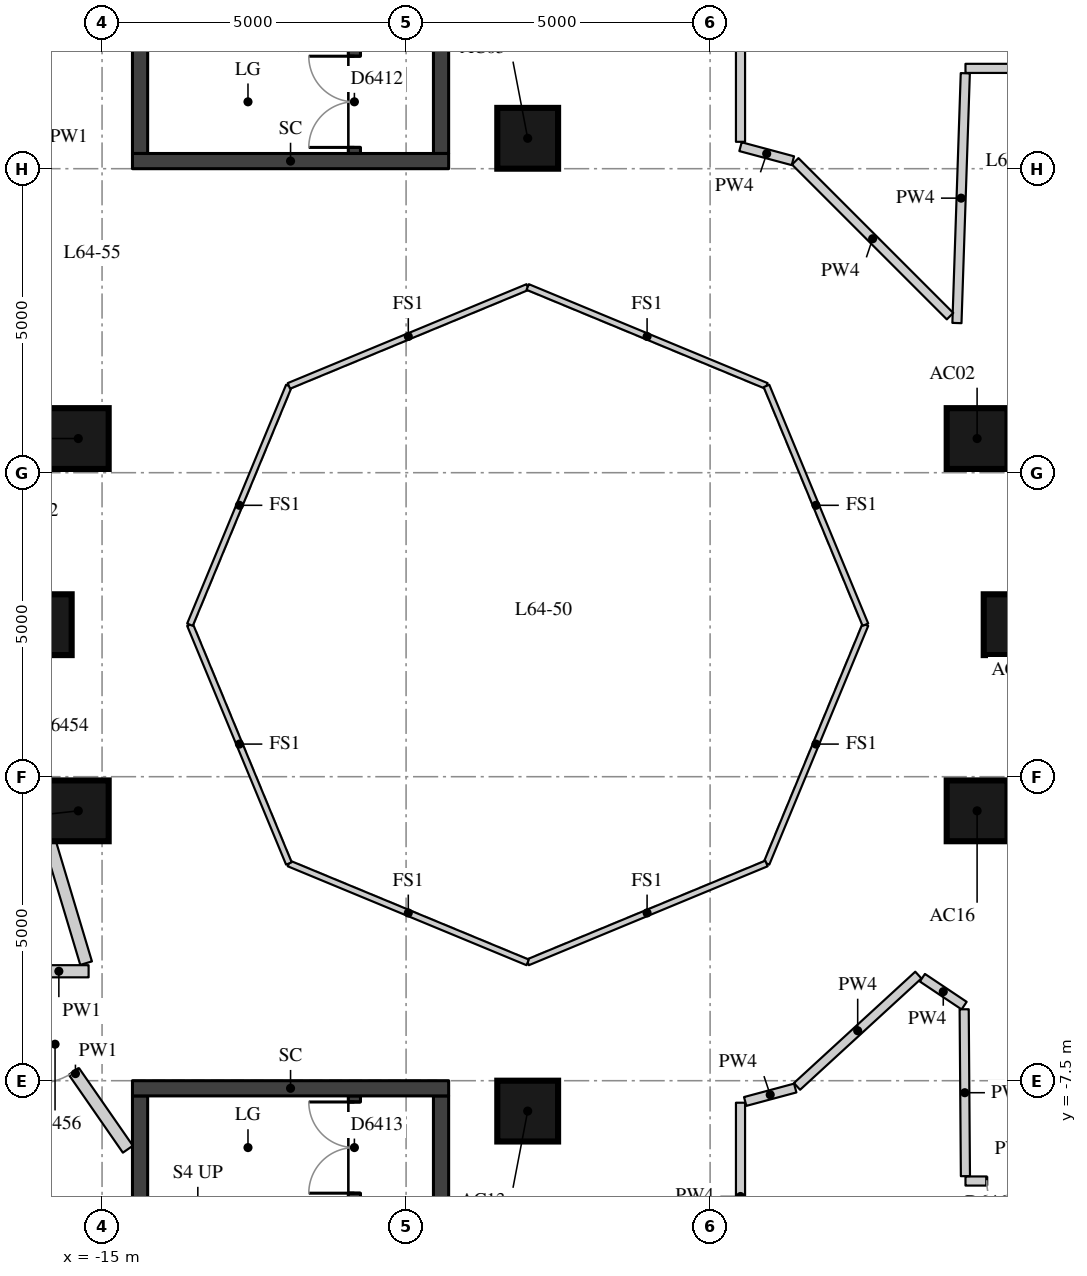
"""IFC4 building model, lengths in metres.
Left out: names, types, materials, properties, quantities, classifications, styles, units other than length and angle.
Written with IfcOpenShell. Run it as: python <this file> out.ifc"""

import sys

from ifc_helpers import new_model, si_unit, direction, frame, frame_2d, origin, origin_2d, place, context, subcontext, project, spatial, rectangle, extrude, element, fill, save


model = new_model("IFC4")
c1 = context("Model", 3, precision=1e-05, world=origin(), true_north=direction((0.0, 1.0)))
c2 = subcontext(c1, "Body", "Model", "MODEL_VIEW")
j1 = project(units=[si_unit("LENGTHUNIT", "METRE"), si_unit("PLANEANGLEUNIT", "RADIAN")], contexts=[c1])
p1 = place(None, origin())
s1 = spatial("IfcSite", under=j1, at=p1, CompositionType="ELEMENT")
p2 = place(p1, origin())
s2 = spatial("IfcBuilding", under=s1, at=p2, CompositionType="ELEMENT")
p3 = place(p2, frame((0.0, 0.0, 225.5)))
s3 = spatial("IfcBuildingStorey", under=s2, at=p3, CompositionType="ELEMENT", Elevation=225.5)
for number, where, z_axis, x_axis in (
    (1, (0.0, 0.0, 0.0), (0.0, 0.0, 1.0), (1.0, 0.0, 0.0)),
    (2, (-0.609, 3.062, 0.0), (0.0, 0.0, 1.0), (1.0, 0.0, 0.0)),
    (3, (-8.0, 8.0, 0.0), (0.0, 0.0, 1.0), (1.0, 0.0, 0.0)),
    (4, (-15.391, 3.062, 0.0), (0.0, 0.0, 1.0), (1.0, 0.0, 0.0)),
    (5, (-16.0, 0.0, 0.0), (0.0, 0.0, 1.0), (1.0, 0.0, 0.0)),
    (6, (-15.391, -3.062, 0.0), (0.0, 0.0, 1.0), (1.0, 0.0, 0.0)),
    (7, (-8.0, -8.0, 0.0), (0.0, 0.0, 1.0), (1.0, 0.0, 0.0)),
    (8, (-0.609, -3.062, 0.0), (0.0, 0.0, 1.0), (1.0, 0.0, 0.0)),
):
    element("IfcColumn", number, at=place(p3, frame(where, z_axis=z_axis, x_axis=x_axis)), inside=s3, PredefinedType="COLUMN", context=c2, shape_type="SweptSolid", body=[
        extrude(rectangle(XDim=1.0, YDim=1.0, at=origin_2d()), origin(), (0.0, 0.0, 1.0), 3.3),
    ])
p4 = place(p3, frame((-10.85, 7.75, 0.0), z_axis=(0.0, 0.0, 1.0), x_axis=(0.0, 1.0, 0.0)))
e9 = element("IfcWall", 9, at=p4, inside=s3, PredefinedType="SHEAR", context=c2, shape_type="SweptSolid", body=[
    extrude(rectangle(XDim=6.0, YDim=0.2, at=frame_2d((3.0, 0.0))), origin(), (0.0, 0.0, 1.0), 2.85),
])
p5 = place(p4, frame((0.1, 0.0, 0.0)))
e10 = element("IfcOpeningElement", 10, at=p5, cuts=e9, PredefinedType="OPENING", context=c2, shape_type="SweptSolid", body=[
    extrude(rectangle(XDim=1.5, YDim=2.1, at=frame_2d((0.75, 1.05))), frame((0.0, 0.11, 0.0), z_axis=(0.0, -1.0, 0.0), x_axis=(1.0, 0.0, 0.0)), (0.0, 0.0, 1.0), 0.22),
])
p6 = place(p3, frame((-10.85, -13.75, 0.0), z_axis=(0.0, 0.0, 1.0), x_axis=(0.0, 1.0, 0.0)))
e11 = element("IfcWall", 11, at=p6, inside=s3, PredefinedType="SHEAR", context=c2, shape_type="SweptSolid", body=[
    extrude(rectangle(XDim=6.0, YDim=0.2, at=frame_2d((3.0, 0.0))), origin(), (0.0, 0.0, 1.0), 2.85),
])
p7 = place(p6, frame((4.4, 0.0, 0.0)))
e12 = element("IfcOpeningElement", 12, at=p7, cuts=e11, PredefinedType="OPENING", context=c2, shape_type="SweptSolid", body=[
    extrude(rectangle(XDim=1.5, YDim=2.1, at=frame_2d((0.75, 1.05))), frame((0.0, 0.11, 0.0), z_axis=(0.0, -1.0, 0.0), x_axis=(1.0, 0.0, 0.0)), (0.0, 0.0, 1.0), 0.22),
])
p8 = place(p3, frame((-14.375, 7.75, -0.28), z_axis=(0.0, 0.0, 1.0), x_axis=(0.0, 1.0, 0.0)))
e13 = element("IfcWall", 13, at=p8, inside=s3, PredefinedType="SHEAR", context=c2, shape_type="SweptSolid", body=[
    extrude(rectangle(XDim=6.0, YDim=0.25, at=frame_2d((3.0, 0.0))), origin(), (0.0, 0.0, 1.0), 3.13),
])
p9 = place(p3, frame((-9.425, 7.75, -0.28), z_axis=(0.0, 0.0, 1.0), x_axis=(0.0, 1.0, 0.0)))
e14 = element("IfcWall", 14, at=p9, inside=s3, PredefinedType="SHEAR", context=c2, shape_type="SweptSolid", body=[
    extrude(rectangle(XDim=6.0, YDim=0.25, at=frame_2d((3.0, 0.0))), origin(), (0.0, 0.0, 1.0), 3.13),
])
p10 = place(p9, frame((2.1, 0.0, 0.28)))
e15 = element("IfcOpeningElement", 15, at=p10, cuts=e14, PredefinedType="OPENING", context=c2, shape_type="SweptSolid", body=[
    extrude(rectangle(XDim=1.5, YDim=2.1, at=frame_2d((0.75, 1.05))), frame((0.0, 0.135, 0.0), z_axis=(0.0, -1.0, 0.0), x_axis=(1.0, 0.0, 0.0)), (0.0, 0.0, 1.0), 0.27),
])
p11 = place(p3, frame((-14.5, 7.625, -0.28), z_axis=(0.0, 0.0, 1.0), x_axis=(1.0, 0.0, 0.0)))
e16 = element("IfcWall", 16, at=p11, inside=s3, PredefinedType="SHEAR", context=c2, shape_type="SweptSolid", body=[
    extrude(rectangle(XDim=5.2, YDim=0.25, at=frame_2d((2.6, 0.0))), origin(), (0.0, 0.0, 1.0), 3.13),
])
p12 = place(p3, frame((-14.375, -13.75, -0.28), z_axis=(0.0, 0.0, 1.0), x_axis=(0.0, 1.0, 0.0)))
e17 = element("IfcWall", 17, at=p12, inside=s3, PredefinedType="SHEAR", context=c2, shape_type="SweptSolid", body=[
    extrude(rectangle(XDim=6.0, YDim=0.25, at=frame_2d((3.0, 0.0))), origin(), (0.0, 0.0, 1.0), 3.13),
])
p13 = place(p3, frame((-9.425, -13.75, -0.28), z_axis=(0.0, 0.0, 1.0), x_axis=(0.0, 1.0, 0.0)))
e18 = element("IfcWall", 18, at=p13, inside=s3, PredefinedType="SHEAR", context=c2, shape_type="SweptSolid", body=[
    extrude(rectangle(XDim=6.0, YDim=0.25, at=frame_2d((3.0, 0.0))), origin(), (0.0, 0.0, 1.0), 3.13),
])
p14 = place(p13, frame((2.4, 0.0, 0.28)))
e19 = element("IfcOpeningElement", 19, at=p14, cuts=e18, PredefinedType="OPENING", context=c2, shape_type="SweptSolid", body=[
    extrude(rectangle(XDim=1.5, YDim=2.1, at=frame_2d((0.75, 1.05))), frame((0.0, 0.135, 0.0), z_axis=(0.0, -1.0, 0.0), x_axis=(1.0, 0.0, 0.0)), (0.0, 0.0, 1.0), 0.27),
])
p15 = place(p3, frame((-14.5, -7.625, -0.28), z_axis=(0.0, 0.0, 1.0), x_axis=(1.0, 0.0, 0.0)))
e20 = element("IfcWall", 20, at=p15, inside=s3, PredefinedType="SHEAR", context=c2, shape_type="SweptSolid", body=[
    extrude(rectangle(XDim=5.2, YDim=0.25, at=frame_2d((2.6, 0.0))), origin(), (0.0, 0.0, 1.0), 3.13),
])
p16 = place(p3, frame((-14.575, -8.627, 0.0), z_axis=(0.0, 0.0, 1.0), x_axis=(-0.569910381143, 0.821706856163, 0.0)))
e21 = element("IfcWall", 21, at=p16, inside=s3, PredefinedType="PARTITIONING", context=c2, shape_type="SweptSolid", body=[
    extrude(rectangle(XDim=3.026, YDim=0.2, at=frame_2d((1.513, 0.0))), origin(), (0.0, 0.0, 1.0), 2.85),
])
p17 = place(p16, frame((1.552, 0.0, 0.0)))
e22 = element("IfcOpeningElement", 22, at=p17, cuts=e21, PredefinedType="OPENING", context=c2, shape_type="SweptSolid", body=[
    extrude(rectangle(XDim=1.1, YDim=2.1, at=frame_2d((0.55, 1.05))), frame((0.0, 0.11, 0.0), z_axis=(0.0, -1.0, 0.0), x_axis=(1.0, 0.0, 0.0)), (0.0, 0.0, 1.0), 0.22),
])
p18 = place(p3, frame((-16.2, -5.7, 0.0), z_axis=(0.0, 0.0, 1.0), x_axis=(1.0, 0.0, 0.0)))
e23 = element("IfcWall", 23, at=p18, inside=s3, PredefinedType="PARTITIONING", context=c2, shape_type="SweptSolid", body=[
    extrude(rectangle(XDim=0.979, YDim=0.2, at=frame_2d((0.489, 0.0))), origin(), (0.0, 0.0, 1.0), 2.85),
])
p19 = place(p3, frame((-15.262, -5.567, 0.0), z_axis=(0.0, 0.0, 1.0), x_axis=(-0.28704593875, 0.957916817395, 0.0)))
e24 = element("IfcWall", 24, at=p19, inside=s3, PredefinedType="PARTITIONING", context=c2, shape_type="SweptSolid", body=[
    extrude(rectangle(XDim=6.751, YDim=0.2, at=frame_2d((3.375, 0.0))), origin(), (0.0, 0.0, 1.0), 2.85),
])
p20 = place(p19, frame((3.259, 0.0, 0.0)))
e25 = element("IfcOpeningElement", 25, at=p20, cuts=e24, PredefinedType="OPENING", context=c2, shape_type="SweptSolid", body=[
    extrude(rectangle(XDim=1.1, YDim=2.1, at=frame_2d((0.55, 1.05))), frame((0.0, 0.11, 0.0), z_axis=(0.0, -1.0, 0.0), x_axis=(1.0, 0.0, 0.0)), (0.0, 0.0, 1.0), 0.22),
])
p21 = place(p3, frame((0.72, 9.15, 0.0), z_axis=(0.0, 0.0, 1.0), x_axis=(-1.0, 0.0, 0.0)))
e26 = element("IfcWall", 26, at=p21, inside=s3, PredefinedType="PARTITIONING", context=c2, shape_type="SweptSolid", body=[
    extrude(rectangle(XDim=1.52, YDim=0.15, at=frame_2d((0.76, 0.0))), origin(), (0.0, 0.0, 1.0), 2.85),
])
p22 = place(p3, frame((-0.803, 9.07, 0.0), z_axis=(0.0, 0.0, 1.0), x_axis=(-0.033496761224, -0.999438826036, 0.0)))
e27 = element("IfcWall", 27, at=p22, inside=s3, PredefinedType="PARTITIONING", context=c2, shape_type="SweptSolid", body=[
    extrude(rectangle(XDim=4.111, YDim=0.15, at=frame_2d((2.055, 0.0))), origin(), (0.0, 0.0, 1.0), 2.85),
])
p23 = place(p3, frame((-1.054, 5.075, 0.0), z_axis=(0.0, 0.0, 1.0), x_axis=(-0.707106781187, 0.707106781187, 0.0)))
e28 = element("IfcWall", 28, at=p23, inside=s3, PredefinedType="PARTITIONING", context=c2, shape_type="SweptSolid", body=[
    extrude(rectangle(XDim=3.601, YDim=0.15, at=frame_2d((1.8, 0.0))), origin(), (0.0, 0.0, 1.0), 2.85),
])
p24 = place(p3, frame((-3.639, 7.631, 0.0), z_axis=(0.0, 0.0, 1.0), x_axis=(-0.965879594242, 0.258991523853, 0.0)))
e29 = element("IfcWall", 29, at=p24, inside=s3, PredefinedType="PARTITIONING", context=c2, shape_type="SweptSolid", body=[
    extrude(rectangle(XDim=0.892, YDim=0.15, at=frame_2d((0.446, 0.0))), origin(), (0.0, 0.0, 1.0), 2.85),
])
p25 = place(p3, frame((-4.5, 7.942, 0.0), z_axis=(0.0, 0.0, 1.0), x_axis=(0.0, 1.0, 0.0)))
e30 = element("IfcWall", 30, at=p25, inside=s3, PredefinedType="PARTITIONING", context=c2, shape_type="SweptSolid", body=[
    extrude(rectangle(XDim=3.538, YDim=0.15, at=frame_2d((1.769, 0.0))), origin(), (0.0, 0.0, 1.0), 2.85),
])
p26 = place(p3, frame((-0.8, -9.15, 0.0), z_axis=(0.0, 0.0, 1.0), x_axis=(1.0, 0.0, 0.0)))
e31 = element("IfcWall", 31, at=p26, inside=s3, PredefinedType="PARTITIONING", context=c2, shape_type="SweptSolid", body=[
    extrude(rectangle(XDim=1.6, YDim=0.15, at=frame_2d((0.8, 0.0))), origin(), (0.0, 0.0, 1.0), 2.85),
])
p27 = place(p26, frame((0.35, 0.0, 0.0)))
e32 = element("IfcOpeningElement", 32, at=p27, cuts=e31, PredefinedType="OPENING", context=c2, shape_type="SweptSolid", body=[
    extrude(rectangle(XDim=0.9, YDim=2.1, at=frame_2d((0.45, 1.05))), frame((0.0, 0.085, 0.0), z_axis=(0.0, -1.0, 0.0), x_axis=(1.0, 0.0, 0.0)), (0.0, 0.0, 1.0), 0.17),
])
p28 = place(p3, frame((-4.5, -10.947, 0.0), z_axis=(0.0, 0.0, 1.0), x_axis=(0.0, 1.0, 0.0)))
e33 = element("IfcWall", 33, at=p28, inside=s3, PredefinedType="PARTITIONING", context=c2, shape_type="SweptSolid", body=[
    extrude(rectangle(XDim=3.085, YDim=0.15, at=frame_2d((1.542, 0.0))), origin(), (0.0, 0.0, 1.0), 2.85),
])
p29 = place(p3, frame((-4.423, -7.842, 0.0), z_axis=(0.0, 0.0, 1.0), x_axis=(0.965853333569, 0.259089440221, 0.0)))
e34 = element("IfcWall", 34, at=p29, inside=s3, PredefinedType="PARTITIONING", context=c2, shape_type="SweptSolid", body=[
    extrude(rectangle(XDim=0.852, YDim=0.15, at=frame_2d((0.426, 0.0))), origin(), (0.0, 0.0, 1.0), 2.85),
])
p30 = place(p3, frame((-3.571, -7.594, 0.0), z_axis=(0.0, 0.0, 1.0), x_axis=(0.736783660812, 0.676128565555, 0.0)))
e35 = element("IfcWall", 35, at=p30, inside=s3, PredefinedType="PARTITIONING", context=c2, shape_type="SweptSolid", body=[
    extrude(rectangle(XDim=2.709, YDim=0.15, at=frame_2d((1.354, 0.0))), origin(), (0.0, 0.0, 1.0), 2.85),
])
p31 = place(p3, frame((-1.509, -5.806, 0.0), z_axis=(0.0, 0.0, 1.0), x_axis=(0.831367153095, -0.55572354346, 0.0)))
e36 = element("IfcWall", 36, at=p31, inside=s3, PredefinedType="PARTITIONING", context=c2, shape_type="SweptSolid", body=[
    extrude(rectangle(XDim=0.825, YDim=0.15, at=frame_2d((0.413, 0.0))), origin(), (0.0, 0.0, 1.0), 2.85),
])
p32 = place(p3, frame((-0.822, -6.325, 0.0), z_axis=(0.0, 0.0, 1.0), x_axis=(0.007471771501, -0.999972085926, 0.0)))
e37 = element("IfcWall", 37, at=p32, inside=s3, PredefinedType="PARTITIONING", context=c2, shape_type="SweptSolid", body=[
    extrude(rectangle(XDim=2.745, YDim=0.15, at=frame_2d((1.372, 0.0))), origin(), (0.0, 0.0, 1.0), 2.85),
])
for number, where, z_axis, x_axis in (
    (38, (-2.446, 0.0, 0.0), (0.0, 0.0, 1.0), (-0.383, -0.924, 0.0)),
    (39, (-4.073, -3.927, 0.0), (0.0, 0.0, 1.0), (-0.924, -0.383, 0.0)),
    (40, (-8.0, -5.554, 0.0), (0.0, 0.0, 1.0), (-0.924, 0.383, 0.0)),
    (41, (-11.927, -3.927, 0.0), (0.0, 0.0, 1.0), (-0.383, 0.924, 0.0)),
    (42, (-13.554, 0.0, 0.0), (0.0, 0.0, 1.0), (0.383, 0.924, 0.0)),
    (43, (-11.927, 3.927, 0.0), (0.0, 0.0, 1.0), (0.924, 0.383, 0.0)),
    (44, (-8.0, 5.554, 0.0), (0.0, 0.0, 1.0), (0.924, -0.383, 0.0)),
    (45, (-4.073, 3.927, 0.0), (0.0, 0.0, 1.0), (0.383, -0.924, 0.0)),
):
    element("IfcWall", number, at=place(p3, frame(where, z_axis=z_axis, x_axis=x_axis)), inside=s3, PredefinedType="PARTITIONING", context=c2, shape_type="SweptSolid", body=[
        extrude(rectangle(XDim=4.251, YDim=0.1, at=frame_2d((2.125, 0.0))), origin(), (0.0, 0.0, 1.0), 2.85),
    ])
p33 = place(p5, origin())
e46 = element("IfcDoor", 46, at=p33, inside=s3, OperationType="DOUBLE_DOOR_SINGLE_SWING", PredefinedType="DOOR", context=c2, shape_type="SweptSolid", body=[
    extrude(rectangle(XDim=1.5, YDim=2.1, at=frame_2d((0.75, 1.05))), frame((0.0, 0.025, 0.0), z_axis=(0.0, -1.0, 0.0), x_axis=(1.0, 0.0, 0.0)), (0.0, 0.0, 1.0), 0.05),
])
fill(e10, e46)
p34 = place(p7, origin())
e47 = element("IfcDoor", 47, at=p34, inside=s3, OperationType="DOUBLE_DOOR_SINGLE_SWING", PredefinedType="DOOR", context=c2, shape_type="SweptSolid", body=[
    extrude(rectangle(XDim=1.5, YDim=2.1, at=frame_2d((0.75, 1.05))), frame((0.0, 0.025, 0.0), z_axis=(0.0, -1.0, 0.0), x_axis=(1.0, 0.0, 0.0)), (0.0, 0.0, 1.0), 0.05),
])
fill(e12, e47)
p35 = place(p17, origin())
e48 = element("IfcDoor", 48, at=p35, inside=s3, OperationType="SINGLE_SWING_RIGHT", PredefinedType="DOOR", context=c2, shape_type="SweptSolid", body=[
    extrude(rectangle(XDim=1.1, YDim=2.1, at=frame_2d((0.55, 1.05))), frame((0.0, 0.025, 0.0), z_axis=(0.0, -1.0, 0.0), x_axis=(1.0, 0.0, 0.0)), (0.0, 0.0, 1.0), 0.05),
])
fill(e22, e48)
p36 = place(p27, origin())
e49 = element("IfcDoor", 49, at=p36, inside=s3, OperationType="SINGLE_SWING_LEFT", PredefinedType="DOOR", context=c2, shape_type="SweptSolid", body=[
    extrude(rectangle(XDim=0.9, YDim=2.1, at=frame_2d((0.45, 1.05))), frame((0.0, 0.025, 0.0), z_axis=(0.0, -1.0, 0.0), x_axis=(1.0, 0.0, 0.0)), (0.0, 0.0, 1.0), 0.05),
])
fill(e32, e49)
save(model, sys.argv[1])
